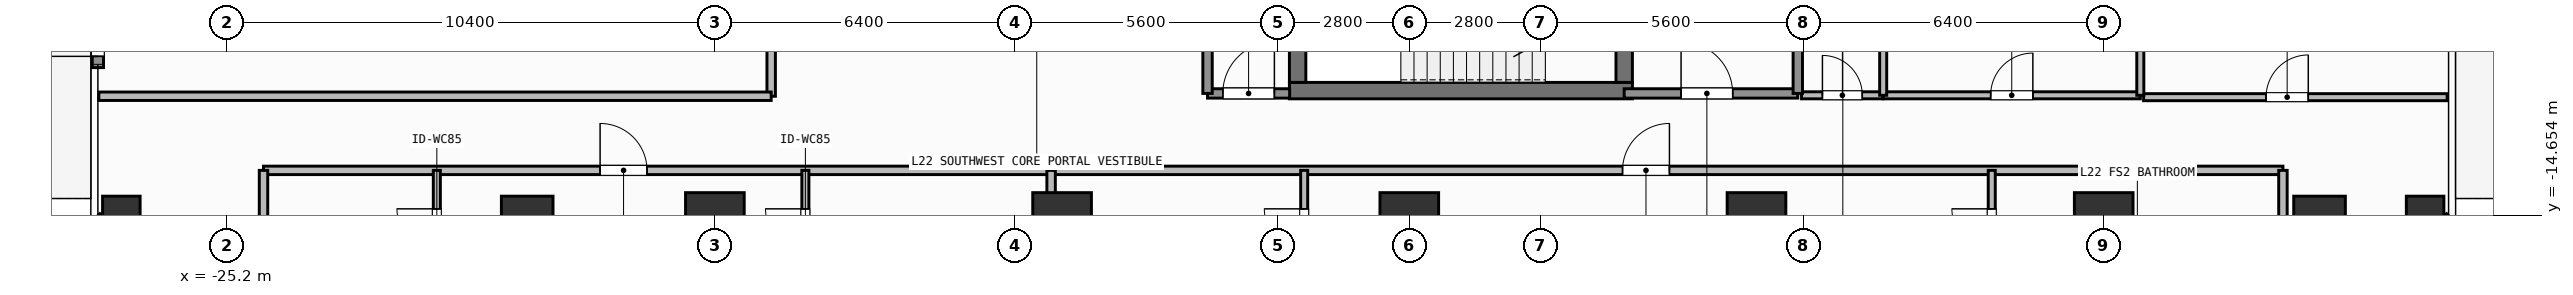
"""IFC4 building model, lengths in metres.
Left out: names, types, materials, properties, quantities, classifications, styles, units other than length and angle.
Written with IfcOpenShell. Run it as: python <this file> out.ifc"""

import sys

from ifc_helpers import new_model, si_unit, direction, frame, frame_2d, origin, origin_2d, place, context, subcontext, project, spatial, rectangle, hollow_rectangle, extrude, element, fill, save


model = new_model("IFC4")
c1 = context("Model", 3, precision=1e-05, world=origin(), true_north=direction((0.0, 1.0)))
c2 = subcontext(c1, "Body", "Model", "MODEL_VIEW")
j1 = project(units=[si_unit("LENGTHUNIT", "METRE"), si_unit("PLANEANGLEUNIT", "RADIAN")], contexts=[c1])
p1 = place(None, origin())
s1 = spatial("IfcSite", under=j1, at=p1, CompositionType="ELEMENT")
p2 = place(p1, origin())
s2 = spatial("IfcBuilding", under=s1, at=p2, CompositionType="ELEMENT")
p3 = place(p2, frame((0.0, 0.0, 89.1)))
s3 = spatial("IfcBuildingStorey", under=s2, at=p3, CompositionType="ELEMENT", Elevation=89.1)
p4 = place(p3, frame((-2.555, -12.0, 0.0), z_axis=(0.0, 0.0, 1.0), x_axis=(1.0, 0.0, 0.0)))
e1 = element("IfcWall", 1, at=p4, inside=s3, PredefinedType="SHEAR", context=c2, shape_type="SweptSolid", body=[
    extrude(rectangle(XDim=7.31, YDim=0.35, at=frame_2d((3.655, 0.0))), origin(), (0.0, 0.0, 1.0), 3.9),
])
p5 = place(p3, frame((-2.38, -11.825, 0.0), z_axis=(0.0, 0.0, 1.0), x_axis=(0.0, 1.0, 0.0)))
e2 = element("IfcWall", 2, at=p5, inside=s3, PredefinedType="SHEAR", context=c2, shape_type="SweptSolid", body=[
    extrude(rectangle(XDim=2.925, YDim=0.35, at=frame_2d((1.462, 0.0))), origin(), (0.0, 0.0, 1.0), 3.9),
])
p6 = place(p3, frame((4.58, -8.9, 0.0), z_axis=(0.0, 0.0, 1.0), x_axis=(0.0, -1.0, 0.0)))
e3 = element("IfcWall", 3, at=p6, inside=s3, PredefinedType="SHEAR", context=c2, shape_type="SweptSolid", body=[
    extrude(rectangle(XDim=2.925, YDim=0.35, at=frame_2d((1.462, 0.0))), origin(), (0.0, 0.0, 1.0), 3.9),
])
p7 = place(p6, frame((0.913, 0.0, 0.0)))
e4 = element("IfcOpeningElement", 4, at=p7, cuts=e3, PredefinedType="OPENING", context=c2, shape_type="SweptSolid", body=[
    extrude(rectangle(XDim=1.1, YDim=2.15, at=frame_2d((0.55, 1.075))), frame((0.0, 0.185, 0.0), z_axis=(0.0, -1.0, 0.0), x_axis=(1.0, 0.0, 0.0)), (0.0, 0.0, 1.0), 0.37),
])
for number, where, z_axis, x_axis in (
    (5, (-14.8, -14.8, 0.0), (0.0, 0.0, 1.0), (1.0, 0.0, 0.0)),
    (6, (-7.4, -14.8, 0.0), (0.0, 0.0, 1.0), (1.0, 0.0, 0.0)),
    (7, (0.0, -14.8, 0.0), (0.0, 0.0, 1.0), (1.0, 0.0, 0.0)),
    (8, (7.4, -14.8, 0.0), (0.0, 0.0, 1.0), (1.0, 0.0, 0.0)),
    (9, (14.8, -14.8, 0.0), (0.0, 0.0, 1.0), (1.0, 0.0, 0.0)),
):
    element("IfcColumn", number, at=place(p3, frame(where, z_axis=z_axis, x_axis=x_axis)), inside=s3, PredefinedType="COLUMN", context=c2, shape_type="SweptSolid", body=[
        extrude(rectangle(XDim=1.25, YDim=1.25, at=origin_2d()), origin(), (0.0, 0.0, 1.0), 3.9),
    ])
for number, where, z_axis, x_axis in (
    (10, (-18.8, -14.8, 0.0), (0.0, 0.0, 1.0), (1.0, 0.0, 0.0)),
    (11, (19.4, -14.8, 0.0), (0.0, 0.0, 1.0), (1.0, 0.0, 0.0)),
):
    element("IfcColumn", number, at=place(p3, frame(where, z_axis=z_axis, x_axis=x_axis)), inside=s3, PredefinedType="COLUMN", context=c2, shape_type="SweptSolid", body=[
        extrude(rectangle(XDim=1.1, YDim=1.1, at=origin_2d()), origin(), (0.0, 0.0, 1.0), 3.9),
    ])
for number, where, z_axis, x_axis in (
    (12, (-27.45, -14.65, 0.0), (0.0, 0.0, 1.0), (1.0, 0.0, 0.0)),
    (13, (21.65, -14.65, 0.0), (0.0, 0.0, 1.0), (1.0, 0.0, 0.0)),
):
    element("IfcColumn", number, at=place(p3, frame(where, z_axis=z_axis, x_axis=x_axis)), inside=s3, PredefinedType="COLUMN", context=c2, shape_type="SweptSolid", body=[
        extrude(hollow_rectangle(XDim=0.8, YDim=0.8, WallThickness=0.036, at=origin_2d()), origin(), (0.0, 0.0, 1.0), 3.9),
    ])
p8 = place(p3, frame((-27.95, -11.51, 0.0), z_axis=(0.0, 0.0, 1.0), x_axis=(0.0, 1.0, 0.0)))
e14 = element("IfcWall", 14, at=p8, inside=s3, PredefinedType="SOLIDWALL", context=c2, shape_type="SweptSolid", body=[
    extrude(rectangle(XDim=1.58, YDim=0.24, at=frame_2d((0.79, 0.0))), origin(), (0.0, 0.0, 1.0), 3.68),
])
p9 = place(p8, frame((0.24, 0.0, 0.0)))
e15 = element("IfcOpeningElement", 15, at=p9, cuts=e14, PredefinedType="OPENING", context=c2, shape_type="SweptSolid", body=[
    extrude(rectangle(XDim=1.1, YDim=2.2, at=frame_2d((0.55, 1.1))), frame((0.0, 0.13, 0.0), z_axis=(0.0, -1.0, 0.0), x_axis=(1.0, 0.0, 0.0)), (0.0, 0.0, 1.0), 0.26),
])
p10 = place(p3, frame((-23.408, -19.292, 0.0), z_axis=(0.0, 0.0, 1.0), x_axis=(-0.707087954376, 0.707125607496, 0.0)))
e16 = element("IfcWall", 16, at=p10, inside=s3, PredefinedType="SOLIDWALL", context=c2, shape_type="SweptSolid", body=[
    extrude(rectangle(XDim=6.484, YDim=0.24, at=frame_2d((3.242, 0.0))), origin(), (0.0, 0.0, 1.0), 3.68),
])
p11 = place(p10, frame((2.492, 0.0, 0.8)))
e17 = element("IfcOpeningElement", 17, at=p11, cuts=e16, PredefinedType="OPENING", context=c2, shape_type="SweptSolid", body=[
    extrude(rectangle(XDim=1.5, YDim=1.85, at=frame_2d((0.75, 0.925))), frame((0.0, 0.13, 0.0), z_axis=(0.0, -1.0, 0.0), x_axis=(1.0, 0.0, 0.0)), (0.0, 0.0, 1.0), 0.26),
])
p12 = place(p3, frame((22.192, -14.708, 0.0), z_axis=(0.0, 0.0, 1.0), x_axis=(-0.707087954376, -0.707125607496, 0.0)))
e18 = element("IfcWall", 18, at=p12, inside=s3, PredefinedType="SOLIDWALL", context=c2, shape_type="SweptSolid", body=[
    extrude(rectangle(XDim=6.484, YDim=0.24, at=frame_2d((3.242, 0.0))), origin(), (0.0, 0.0, 1.0), 3.68),
])
p13 = place(p12, frame((2.492, 0.0, 0.8)))
e19 = element("IfcOpeningElement", 19, at=p13, cuts=e18, PredefinedType="OPENING", context=c2, shape_type="SweptSolid", body=[
    extrude(rectangle(XDim=1.5, YDim=1.85, at=frame_2d((0.75, 0.925))), frame((0.0, 0.13, 0.0), z_axis=(0.0, -1.0, 0.0), x_axis=(1.0, 0.0, 0.0)), (0.0, 0.0, 1.0), 0.26),
])
p14 = place(p3, frame((4.58, -12.06, 0.0), z_axis=(0.0, 0.0, 1.0), x_axis=(1.0, 0.0, 0.0)))
e20 = element("IfcWall", 20, at=p14, inside=s3, PredefinedType="SOLIDWALL", context=c2, shape_type="SweptSolid", body=[
    extrude(rectangle(XDim=3.7, YDim=0.2, at=frame_2d((1.85, 0.0))), origin(), (0.0, 0.0, 1.0), 3.68),
])
p15 = place(p14, frame((1.212, 0.0, 0.0)))
e21 = element("IfcOpeningElement", 21, at=p15, cuts=e20, PredefinedType="OPENING", context=c2, shape_type="SweptSolid", body=[
    extrude(rectangle(XDim=1.1, YDim=2.15, at=frame_2d((0.55, 1.075))), frame((0.0, 0.11, 0.0), z_axis=(0.0, -1.0, 0.0), x_axis=(1.0, 0.0, 0.0)), (0.0, 0.0, 1.0), 0.22),
])
p16 = place(p3, frame((-4.3, -12.06, 0.0), z_axis=(0.0, 0.0, 1.0), x_axis=(1.0, 0.0, 0.0)))
e22 = element("IfcWall", 22, at=p16, inside=s3, PredefinedType="SOLIDWALL", context=c2, shape_type="SweptSolid", body=[
    extrude(rectangle(XDim=1.75, YDim=0.2, at=frame_2d((0.875, 0.0))), origin(), (0.0, 0.0, 1.0), 3.68),
])
p17 = place(p16, frame((0.325, 0.0, 0.0)))
e23 = element("IfcOpeningElement", 23, at=p17, cuts=e22, PredefinedType="OPENING", context=c2, shape_type="SweptSolid", body=[
    extrude(rectangle(XDim=1.1, YDim=2.15, at=frame_2d((0.55, 1.075))), frame((0.0, 0.11, 0.0), z_axis=(0.0, -1.0, 0.0), x_axis=(1.0, 0.0, 0.0)), (0.0, 0.0, 1.0), 0.22),
])
p18 = place(p3, frame((8.36, -12.1, 0.0), z_axis=(0.0, 0.0, 1.0), x_axis=(1.0, 0.0, 0.0)))
e24 = element("IfcWall", 24, at=p18, inside=s3, PredefinedType="PARTITIONING", context=c2, shape_type="SweptSolid", body=[
    extrude(rectangle(XDim=1.74, YDim=0.15, at=frame_2d((0.87, 0.0))), origin(), (0.0, 0.0, 1.0), 3.68),
])
p19 = place(p18, frame((0.445, 0.0, 0.0)))
e25 = element("IfcOpeningElement", 25, at=p19, cuts=e24, PredefinedType="OPENING", context=c2, shape_type="SweptSolid", body=[
    extrude(rectangle(XDim=0.85, YDim=2.1, at=frame_2d((0.425, 1.05))), frame((0.0, 0.085, 0.0), z_axis=(0.0, -1.0, 0.0), x_axis=(1.0, 0.0, 0.0)), (0.0, 0.0, 1.0), 0.17),
])
p20 = place(p3, frame((10.1, -12.1, 0.0), z_axis=(0.0, 0.0, 1.0), x_axis=(1.0, 0.0, 0.0)))
e26 = element("IfcWall", 26, at=p20, inside=s3, PredefinedType="PARTITIONING", context=c2, shape_type="SweptSolid", body=[
    extrude(rectangle(XDim=5.48, YDim=0.15, at=frame_2d((2.74, 0.0))), origin(), (0.0, 0.0, 1.0), 3.68),
])
p21 = place(p20, frame((2.29, 0.0, 0.0)))
e27 = element("IfcOpeningElement", 27, at=p21, cuts=e26, PredefinedType="OPENING", context=c2, shape_type="SweptSolid", body=[
    extrude(rectangle(XDim=0.9, YDim=2.1, at=frame_2d((0.45, 1.05))), frame((0.0, 0.085, 0.0), z_axis=(0.0, -1.0, 0.0), x_axis=(1.0, 0.0, 0.0)), (0.0, 0.0, 1.0), 0.17),
])
p22 = place(p3, frame((-24.42, -13.7, 0.0), z_axis=(0.0, 0.0, 1.0), x_axis=(1.0, 0.0, 0.0)))
e28 = element("IfcWall", 28, at=p22, inside=s3, PredefinedType="PARTITIONING", context=c2, shape_type="SweptSolid", body=[
    extrude(rectangle(XDim=16.786, YDim=0.18, at=frame_2d((8.393, 0.0))), origin(), (0.0, 0.0, 1.0), 3.68),
])
p23 = place(p22, frame((7.174, 0.0, 0.0)))
e29 = element("IfcOpeningElement", 29, at=p23, cuts=e28, PredefinedType="OPENING", context=c2, shape_type="SweptSolid", body=[
    extrude(rectangle(XDim=1.0, YDim=2.2, at=frame_2d((0.5, 1.1))), frame((0.0, 0.1, 0.0), z_axis=(0.0, -1.0, 0.0), x_axis=(1.0, 0.0, 0.0)), (0.0, 0.0, 1.0), 0.2),
])
p24 = place(p3, frame((-20.726, -16.19, 0.0), z_axis=(0.0, 0.0, 1.0), x_axis=(0.0, 1.0, 0.0)))
e30 = element("IfcWall", 30, at=p24, inside=s3, PredefinedType="PARTITIONING", context=c2, shape_type="SweptSolid", body=[
    extrude(rectangle(XDim=2.49, YDim=0.15, at=frame_2d((1.245, 0.0))), origin(), (0.0, 0.0, 1.0), 3.68),
])
p25 = place(p24, frame((0.82, 0.0, 0.0)))
e31 = element("IfcOpeningElement", 31, at=p25, cuts=e30, PredefinedType="OPENING", context=c2, shape_type="SweptSolid", body=[
    extrude(rectangle(XDim=0.85, YDim=2.1, at=frame_2d((0.425, 1.05))), frame((0.0, 0.085, 0.0), z_axis=(0.0, -1.0, 0.0), x_axis=(1.0, 0.0, 0.0)), (0.0, 0.0, 1.0), 0.17),
])
p26 = place(p3, frame((-12.871, -16.19, 0.0), z_axis=(0.0, 0.0, 1.0), x_axis=(0.0, 1.0, 0.0)))
e32 = element("IfcWall", 32, at=p26, inside=s3, PredefinedType="PARTITIONING", context=c2, shape_type="SweptSolid", body=[
    extrude(rectangle(XDim=2.49, YDim=0.15, at=frame_2d((1.245, 0.0))), origin(), (0.0, 0.0, 1.0), 3.68),
])
p27 = place(p26, frame((0.82, 0.0, 0.0)))
e33 = element("IfcOpeningElement", 33, at=p27, cuts=e32, PredefinedType="OPENING", context=c2, shape_type="SweptSolid", body=[
    extrude(rectangle(XDim=0.85, YDim=2.1, at=frame_2d((0.425, 1.05))), frame((0.0, 0.085, 0.0), z_axis=(0.0, -1.0, 0.0), x_axis=(1.0, 0.0, 0.0)), (0.0, 0.0, 1.0), 0.17),
])
p28 = place(p3, frame((-7.634, -13.7, 0.0), z_axis=(0.0, 0.0, 1.0), x_axis=(1.0, 0.0, 0.0)))
e34 = element("IfcWall", 34, at=p28, inside=s3, PredefinedType="PARTITIONING", context=c2, shape_type="SweptSolid", body=[
    extrude(rectangle(XDim=26.254, YDim=0.18, at=frame_2d((13.127, 0.0))), origin(), (0.0, 0.0, 1.0), 3.68),
])
p29 = place(p28, frame((12.178, 0.0, 0.0)))
e35 = element("IfcOpeningElement", 35, at=p29, cuts=e34, PredefinedType="OPENING", context=c2, shape_type="SweptSolid", body=[
    extrude(rectangle(XDim=1.0, YDim=2.2, at=frame_2d((0.5, 1.1))), frame((0.0, 0.1, 0.0), z_axis=(0.0, -1.0, 0.0), x_axis=(1.0, 0.0, 0.0)), (0.0, 0.0, 1.0), 0.2),
])
p30 = place(p3, frame((-2.24, -16.19, 0.0), z_axis=(0.0, 0.0, 1.0), x_axis=(0.0, 1.0, 0.0)))
e36 = element("IfcWall", 36, at=p30, inside=s3, PredefinedType="PARTITIONING", context=c2, shape_type="SweptSolid", body=[
    extrude(rectangle(XDim=2.49, YDim=0.15, at=frame_2d((1.245, 0.0))), origin(), (0.0, 0.0, 1.0), 3.68),
])
p31 = place(p30, frame((0.82, 0.0, 0.0)))
e37 = element("IfcOpeningElement", 37, at=p31, cuts=e36, PredefinedType="OPENING", context=c2, shape_type="SweptSolid", body=[
    extrude(rectangle(XDim=0.85, YDim=2.1, at=frame_2d((0.425, 1.05))), frame((0.0, 0.085, 0.0), z_axis=(0.0, -1.0, 0.0), x_axis=(1.0, 0.0, 0.0)), (0.0, 0.0, 1.0), 0.17),
])
p32 = place(p3, frame((12.414, -16.19, 0.0), z_axis=(0.0, 0.0, 1.0), x_axis=(0.0, 1.0, 0.0)))
e38 = element("IfcWall", 38, at=p32, inside=s3, PredefinedType="PARTITIONING", context=c2, shape_type="SweptSolid", body=[
    extrude(rectangle(XDim=2.49, YDim=0.15, at=frame_2d((1.245, 0.0))), origin(), (0.0, 0.0, 1.0), 3.68),
])
p33 = place(p32, frame((0.82, 0.0, 0.0)))
e39 = element("IfcOpeningElement", 39, at=p33, cuts=e38, PredefinedType="OPENING", context=c2, shape_type="SweptSolid", body=[
    extrude(rectangle(XDim=0.85, YDim=2.1, at=frame_2d((0.425, 1.05))), frame((0.0, 0.085, 0.0), z_axis=(0.0, -1.0, 0.0), x_axis=(1.0, 0.0, 0.0)), (0.0, 0.0, 1.0), 0.17),
])
p34 = place(p3, frame((-13.6, -12.12, 0.0), z_axis=(0.0, 0.0, 1.0), x_axis=(0.0, 1.0, 0.0)))
e40 = element("IfcWall", 40, at=p34, inside=s3, PredefinedType="PARTITIONING", context=c2, shape_type="SweptSolid", body=[
    extrude(rectangle(XDim=9.389, YDim=0.18, at=frame_2d((4.695, 0.0))), origin(), (0.0, 0.0, 1.0), 3.68),
])
p35 = place(p34, frame((1.415, 0.0, 0.0)))
e41 = element("IfcOpeningElement", 41, at=p35, cuts=e40, PredefinedType="OPENING", context=c2, shape_type="SweptSolid", body=[
    extrude(rectangle(XDim=1.0, YDim=2.2, at=frame_2d((0.5, 1.1))), frame((0.0, 0.1, 0.0), z_axis=(0.0, -1.0, 0.0), x_axis=(1.0, 0.0, 0.0)), (0.0, 0.0, 1.0), 0.2),
])
p36 = place(p3, frame((15.65, -12.14, 0.0), z_axis=(0.0, 0.0, 1.0), x_axis=(1.0, 0.0, 0.0)))
e42 = element("IfcWall", 42, at=p36, inside=s3, PredefinedType="PARTITIONING", context=c2, shape_type="SweptSolid", body=[
    extrude(rectangle(XDim=6.47, YDim=0.15, at=frame_2d((3.235, 0.0))), origin(), (0.0, 0.0, 1.0), 3.68),
])
p37 = place(p36, frame((2.61, 0.0, 0.0)))
e43 = element("IfcOpeningElement", 43, at=p37, cuts=e42, PredefinedType="OPENING", context=c2, shape_type="SweptSolid", body=[
    extrude(rectangle(XDim=0.9, YDim=2.1, at=frame_2d((0.45, 1.05))), frame((0.0, 0.085, 0.0), z_axis=(0.0, -1.0, 0.0), x_axis=(1.0, 0.0, 0.0)), (0.0, 0.0, 1.0), 0.17),
])
for number, where, z_axis, x_axis in (
    (44, (8.28, -12.06, 0.0), (0.0, 0.0, 1.0), (0.0, 1.0, 0.0)),
    (45, (-4.3, -12.06, 0.0), (0.0, 0.0, 1.0), (0.0, 1.0, 0.0)),
):
    element("IfcWall", number, at=place(p3, frame(where, z_axis=z_axis, x_axis=x_axis)), inside=s3, PredefinedType="SOLIDWALL", context=c2, shape_type="SweptSolid", body=[
        extrude(rectangle(XDim=3.185, YDim=0.2, at=frame_2d((1.593, 0.0))), origin(), (0.0, 0.0, 1.0), 3.68),
    ])
p38 = place(p3, frame((10.1, -12.1, 0.0), z_axis=(0.0, 0.0, 1.0), x_axis=(0.0, 1.0, 0.0)))
e46 = element("IfcWall", 46, at=p38, inside=s3, PredefinedType="PARTITIONING", context=c2, shape_type="SweptSolid", body=[
    extrude(rectangle(XDim=2.35, YDim=0.15, at=frame_2d((1.175, 0.0))), origin(), (0.0, 0.0, 1.0), 3.68),
])
p39 = place(p3, frame((15.58, -12.1, 0.0), z_axis=(0.0, 0.0, 1.0), x_axis=(0.0, 1.0, 0.0)))
e47 = element("IfcWall", 47, at=p39, inside=s3, PredefinedType="PARTITIONING", context=c2, shape_type="SweptSolid", body=[
    extrude(rectangle(XDim=6.25, YDim=0.15, at=frame_2d((3.125, 0.0))), origin(), (0.0, 0.0, 1.0), 3.68),
])
for number, where, z_axis, x_axis in (
    (48, (-24.42, -18.11, 0.0), (0.0, 0.0, 1.0), (0.0, 1.0, 0.0)),
    (49, (18.62, -18.11, 0.0), (0.0, 0.0, 1.0), (0.0, 1.0, 0.0)),
):
    element("IfcWall", number, at=place(p3, frame(where, z_axis=z_axis, x_axis=x_axis)), inside=s3, PredefinedType="PARTITIONING", context=c2, shape_type="SweptSolid", body=[
        extrude(rectangle(XDim=4.41, YDim=0.18, at=frame_2d((2.205, 0.0))), origin(), (0.0, 0.0, 1.0), 3.68),
    ])
p40 = place(p3, frame((-7.634, -19.23, 0.0), z_axis=(0.0, 0.0, 1.0), x_axis=(0.0, 1.0, 0.0)))
e50 = element("IfcWall", 50, at=p40, inside=s3, PredefinedType="PARTITIONING", context=c2, shape_type="SweptSolid", body=[
    extrude(rectangle(XDim=5.53, YDim=0.18, at=frame_2d((2.765, 0.0))), origin(), (0.0, 0.0, 1.0), 3.082),
])
p41 = place(p3, frame((-27.93, -12.12, 0.0), z_axis=(0.0, 0.0, 1.0), x_axis=(1.0, 0.0, 0.0)))
e51 = element("IfcWall", 51, at=p41, inside=s3, PredefinedType="PARTITIONING", context=c2, shape_type="SweptSolid", body=[
    extrude(rectangle(XDim=14.33, YDim=0.18, at=frame_2d((7.165, 0.0))), origin(), (0.0, 0.0, 1.0), 3.68),
])
p42 = place(p9, origin())
e52 = element("IfcDoor", 52, at=p42, inside=s3, OperationType="SINGLE_SWING_LEFT", PredefinedType="DOOR", context=c2, shape_type="SweptSolid", body=[
    extrude(rectangle(XDim=1.1, YDim=2.2, at=frame_2d((0.55, 1.1))), frame((0.0, 0.025, 0.0), z_axis=(0.0, -1.0, 0.0), x_axis=(1.0, 0.0, 0.0)), (0.0, 0.0, 1.0), 0.05),
])
fill(e15, e52)
p43 = place(p15, origin())
e53 = element("IfcDoor", 53, at=p43, inside=s3, OperationType="SINGLE_SWING_LEFT", PredefinedType="DOOR", context=c2, shape_type="SweptSolid", body=[
    extrude(rectangle(XDim=1.1, YDim=2.15, at=frame_2d((0.55, 1.075))), frame((0.0, 0.025, 0.0), z_axis=(0.0, -1.0, 0.0), x_axis=(1.0, 0.0, 0.0)), (0.0, 0.0, 1.0), 0.05),
])
fill(e21, e53)
p44 = place(p17, origin())
e54 = element("IfcDoor", 54, at=p44, inside=s3, OperationType="SINGLE_SWING_RIGHT", PredefinedType="DOOR", context=c2, shape_type="SweptSolid", body=[
    extrude(rectangle(XDim=1.1, YDim=2.15, at=frame_2d((0.55, 1.075))), frame((0.0, 0.025, 0.0), z_axis=(0.0, -1.0, 0.0), x_axis=(1.0, 0.0, 0.0)), (0.0, 0.0, 1.0), 0.05),
])
fill(e23, e54)
p45 = place(p19, origin())
e55 = element("IfcDoor", 55, at=p45, inside=s3, OperationType="SINGLE_SWING_LEFT", PredefinedType="DOOR", context=c2, shape_type="SweptSolid", body=[
    extrude(rectangle(XDim=0.85, YDim=2.1, at=frame_2d((0.425, 1.05))), frame((0.0, 0.025, 0.0), z_axis=(0.0, -1.0, 0.0), x_axis=(1.0, 0.0, 0.0)), (0.0, 0.0, 1.0), 0.05),
])
fill(e25, e55)
p46 = place(p21, origin())
e56 = element("IfcDoor", 56, at=p46, inside=s3, OperationType="SINGLE_SWING_RIGHT", PredefinedType="DOOR", context=c2, shape_type="SweptSolid", body=[
    extrude(rectangle(XDim=0.9, YDim=2.1, at=frame_2d((0.45, 1.05))), frame((0.0, 0.025, 0.0), z_axis=(0.0, -1.0, 0.0), x_axis=(1.0, 0.0, 0.0)), (0.0, 0.0, 1.0), 0.05),
])
fill(e27, e56)
p47 = place(p23, origin())
e57 = element("IfcDoor", 57, at=p47, inside=s3, OperationType="SINGLE_SWING_LEFT", PredefinedType="DOOR", context=c2, shape_type="SweptSolid", body=[
    extrude(rectangle(XDim=1.0, YDim=2.2, at=frame_2d((0.5, 1.1))), frame((0.0, 0.025, 0.0), z_axis=(0.0, -1.0, 0.0), x_axis=(1.0, 0.0, 0.0)), (0.0, 0.0, 1.0), 0.05),
])
fill(e29, e57)
p48 = place(p25, origin())
e58 = element("IfcDoor", 58, at=p48, inside=s3, OperationType="SINGLE_SWING_RIGHT", PredefinedType="DOOR", context=c2, shape_type="SweptSolid", body=[
    extrude(rectangle(XDim=0.85, YDim=2.1, at=frame_2d((0.425, 1.05))), frame((0.0, 0.025, 0.0), z_axis=(0.0, -1.0, 0.0), x_axis=(1.0, 0.0, 0.0)), (0.0, 0.0, 1.0), 0.05),
])
fill(e31, e58)
p49 = place(p27, origin())
e59 = element("IfcDoor", 59, at=p49, inside=s3, OperationType="SINGLE_SWING_RIGHT", PredefinedType="DOOR", context=c2, shape_type="SweptSolid", body=[
    extrude(rectangle(XDim=0.85, YDim=2.1, at=frame_2d((0.425, 1.05))), frame((0.0, 0.025, 0.0), z_axis=(0.0, -1.0, 0.0), x_axis=(1.0, 0.0, 0.0)), (0.0, 0.0, 1.0), 0.05),
])
fill(e33, e59)
p50 = place(p29, origin())
e60 = element("IfcDoor", 60, at=p50, inside=s3, OperationType="SINGLE_SWING_RIGHT", PredefinedType="DOOR", context=c2, shape_type="SweptSolid", body=[
    extrude(rectangle(XDim=1.0, YDim=2.2, at=frame_2d((0.5, 1.1))), frame((0.0, 0.025, 0.0), z_axis=(0.0, -1.0, 0.0), x_axis=(1.0, 0.0, 0.0)), (0.0, 0.0, 1.0), 0.05),
])
fill(e35, e60)
p51 = place(p31, origin())
e61 = element("IfcDoor", 61, at=p51, inside=s3, OperationType="SINGLE_SWING_RIGHT", PredefinedType="DOOR", context=c2, shape_type="SweptSolid", body=[
    extrude(rectangle(XDim=0.85, YDim=2.1, at=frame_2d((0.425, 1.05))), frame((0.0, 0.025, 0.0), z_axis=(0.0, -1.0, 0.0), x_axis=(1.0, 0.0, 0.0)), (0.0, 0.0, 1.0), 0.05),
])
fill(e37, e61)
p52 = place(p33, origin())
e62 = element("IfcDoor", 62, at=p52, inside=s3, OperationType="SINGLE_SWING_RIGHT", PredefinedType="DOOR", context=c2, shape_type="SweptSolid", body=[
    extrude(rectangle(XDim=0.85, YDim=2.1, at=frame_2d((0.425, 1.05))), frame((0.0, 0.025, 0.0), z_axis=(0.0, -1.0, 0.0), x_axis=(1.0, 0.0, 0.0)), (0.0, 0.0, 1.0), 0.05),
])
fill(e39, e62)
p53 = place(p37, origin())
e63 = element("IfcDoor", 63, at=p53, inside=s3, OperationType="SINGLE_SWING_RIGHT", PredefinedType="DOOR", context=c2, shape_type="SweptSolid", body=[
    extrude(rectangle(XDim=0.9, YDim=2.1, at=frame_2d((0.45, 1.05))), frame((0.0, 0.025, 0.0), z_axis=(0.0, -1.0, 0.0), x_axis=(1.0, 0.0, 0.0)), (0.0, 0.0, 1.0), 0.05),
])
fill(e43, e63)
save(model, sys.argv[1])
